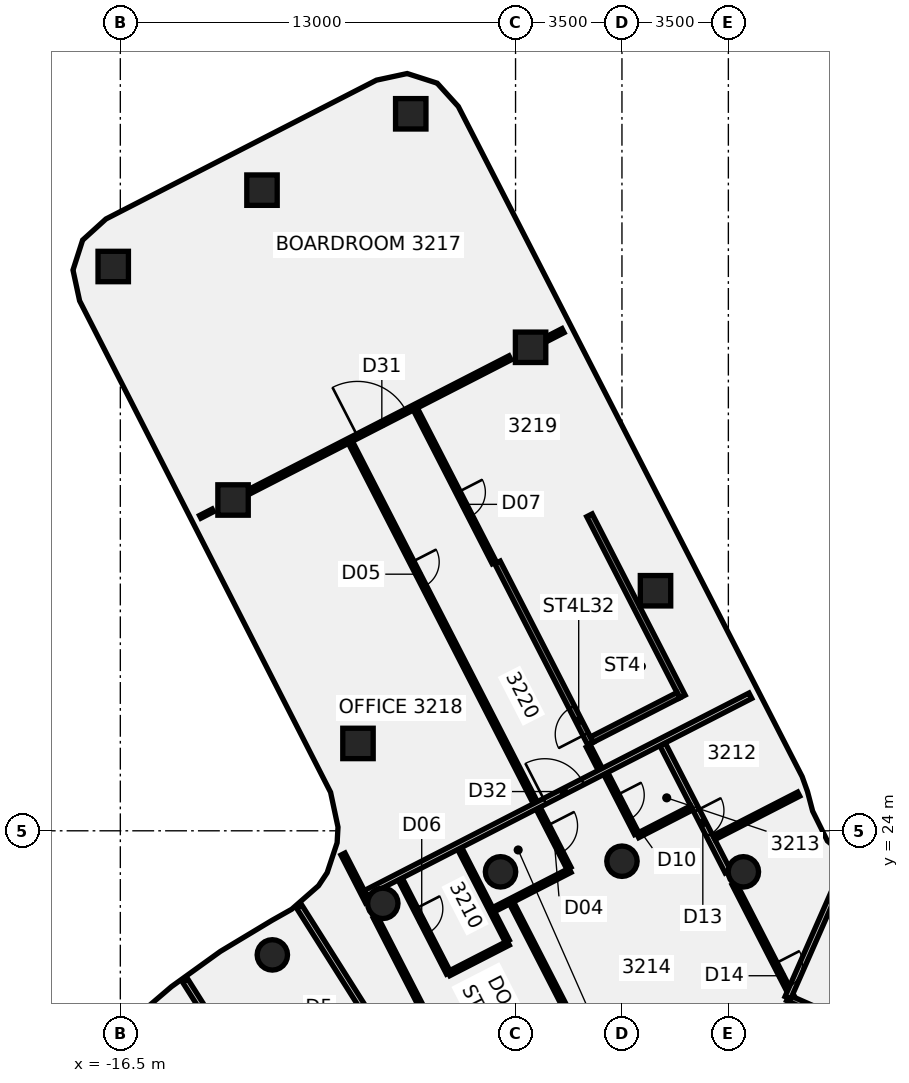
"""IFC4 building model, lengths in metres.
Left out: names, types, materials, properties, quantities, classifications, styles, units other than length and angle.
Written with IfcOpenShell. Run it as: python <this file> out.ifc"""

import sys

from ifc_helpers import new_model, si_unit, direction, frame, frame_2d, origin, origin_2d, place, context, subcontext, project, spatial, polyline, rectangle, circle, outline, extrude, element, fill, save


model = new_model("IFC4")
c1 = context("Model", 3, precision=1e-05, world=origin(), true_north=direction((0.0, 1.0)))
c2 = subcontext(c1, "Body", "Model", "MODEL_VIEW")
j1 = project(units=[si_unit("LENGTHUNIT", "METRE"), si_unit("PLANEANGLEUNIT", "RADIAN")], contexts=[c1])
p1 = place(None, origin())
s1 = spatial("IfcSite", under=j1, at=p1, CompositionType="ELEMENT")
p2 = place(p1, origin())
s2 = spatial("IfcBuilding", under=s1, at=p2, CompositionType="ELEMENT")
p3 = place(p2, frame((0.0, 0.0, 133.0)))
s3 = spatial("IfcBuildingStorey", under=s2, at=p3, CompositionType="ELEMENT", Elevation=133.0)
for number, where, z_axis, x_axis in (
    (1, (3.994, 22.651, -0.14), (0.0, 0.0, 1.0), (1.0, 0.0, 0.0)),
    (2, (0.0, 23.0, -0.14), (0.0, 0.0, 1.0), (1.0, 0.0, 0.0)),
    (3, (-3.994, 22.651, -0.14), (0.0, 0.0, 1.0), (1.0, 0.0, 0.0)),
    (4, (-7.866, 21.613, -0.14), (0.0, 0.0, 1.0), (1.0, 0.0, 0.0)),
    (5, (-11.5, 19.919, -0.14), (0.0, 0.0, 1.0), (1.0, 0.0, 0.0)),
):
    element("IfcColumn", number, at=place(p3, frame(where, z_axis=z_axis, x_axis=x_axis)), inside=s3, PredefinedType="COLUMN", context=c2, shape_type="SweptSolid", body=[
        extrude(circle(Radius=0.5, at=origin_2d()), origin(), (0.0, 0.0, 1.0), 3.75),
    ])
p4 = place(p3, frame((-12.792, 34.88, -0.134), z_axis=(-0.061871859426, -0.062521773916, 0.996123938472), x_axis=(0.887299968667, 0.453556116001, 0.083579993069)))
e6 = element("IfcColumn", 6, at=p4, inside=s3, PredefinedType="COLUMN", context=c2, shape_type="SweptSolid", body=[
    extrude(rectangle(XDim=1.0, YDim=1.0, at=origin_2d()), origin(), (0.0, 0.0, 1.0), 3.757),
])
p5 = place(p3, frame((-3.006, 39.903, -0.134), z_axis=(-0.086557736741, -0.015336055459, 0.996128788668), x_axis=(0.455375187571, -0.889923738813, 0.025868468099)))
e7 = element("IfcColumn", 7, at=p5, inside=s3, PredefinedType="COLUMN", context=c2, shape_type="SweptSolid", body=[
    extrude(rectangle(XDim=1.0, YDim=1.0, at=origin_2d()), origin(), (0.0, 0.0, 1.0), 3.757),
])
p6 = place(p3, frame((-8.683, 26.873, -0.136), z_axis=(-0.023249815242, -0.042396721911, 0.99883029793), x_axis=(0.888891864763, 0.45636204272, 0.040061686479)))
e8 = element("IfcColumn", 8, at=p6, inside=s3, PredefinedType="COLUMN", context=c2, shape_type="SweptSolid", body=[
    extrude(rectangle(XDim=1.0, YDim=1.0, at=origin_2d()), origin(), (0.0, 0.0, 1.0), 3.749),
])
p7 = place(p3, frame((1.104, 31.896, -0.136), z_axis=(-0.048124572307, 0.004949211766, 0.998829079895), x_axis=(0.455474581289, -0.889858610868, 0.026354477116)))
e9 = element("IfcColumn", 9, at=p7, inside=s3, PredefinedType="COLUMN", context=c2, shape_type="SweptSolid", body=[
    extrude(rectangle(XDim=1.0, YDim=1.0, at=origin_2d()), origin(), (0.0, 0.0, 1.0), 3.749),
])
p8 = place(p3, frame((-6.947, 47.583, -0.131), z_axis=(-0.130025765362, -0.021573490305, 0.991275887358), x_axis=(0.454113091891, -0.890036848371, 0.04019587435)))
e10 = element("IfcColumn", 10, at=p8, inside=s3, PredefinedType="COLUMN", context=c2, shape_type="SweptSolid", body=[
    extrude(rectangle(XDim=1.0, YDim=1.0, at=origin_2d()), origin(), (0.0, 0.0, 1.0), 3.757),
])
p9 = place(p3, frame((-11.84, 45.071, -0.133), z_axis=(-0.117801332946, -0.045053158792, 0.992014646484), x_axis=(0.455693217506, -0.890031586101, 0.013691868468)))
e11 = element("IfcColumn", 11, at=p9, inside=s3, PredefinedType="COLUMN", context=c2, shape_type="SweptSolid", body=[
    extrude(rectangle(XDim=1.0, YDim=1.0, at=origin_2d()), origin(), (0.0, 0.0, 1.0), 3.755),
])
p10 = place(p3, frame((-16.733, 42.56, -0.132), z_axis=(-0.105474361583, -0.068538826824, 0.992057250498), x_axis=(0.883135905889, 0.452121084233, 0.125129920171)))
e12 = element("IfcColumn", 12, at=p10, inside=s3, PredefinedType="COLUMN", context=c2, shape_type="SweptSolid", body=[
    extrude(rectangle(XDim=1.0, YDim=1.0, at=origin_2d()), origin(), (0.0, 0.0, 1.0), 3.754),
])
p11 = place(p3, frame((-9.176, 23.235, 0.0), z_axis=(0.0, 0.0, 1.0), x_axis=(0.456484124578, -0.889731557273, 0.0)))
e13 = element("IfcWall", 13, at=p11, inside=s3, PredefinedType="PARTITIONING", context=c2, shape_type="SweptSolid", body=[
    extrude(rectangle(XDim=1.776, YDim=0.15, at=frame_2d((0.888, 0.0))), origin(), (0.0, 0.0, 1.0), 3.01),
])
p12 = place(p3, frame((-8.116, 21.17, 0.0), z_axis=(0.0, 0.0, 1.0), x_axis=(0.456543941527, -0.889700865154, 0.0)))
e14 = element("IfcWall", 14, at=p12, inside=s3, PredefinedType="PARTITIONING", context=c2, shape_type="SweptSolid", body=[
    extrude(rectangle(XDim=10.314, YDim=0.15, at=frame_2d((5.157, 0.0))), origin(), (0.0, 0.0, 1.0), 3.01),
])
p13 = place(p3, frame((-8.932, 36.777, 0.0), z_axis=(0.0, 0.0, 1.0), x_axis=(0.456530071129, -0.889707982517, 0.0)))
e15 = element("IfcWall", 15, at=p13, inside=s3, PredefinedType="PARTITIONING", context=c2, shape_type="SweptSolid", body=[
    extrude(rectangle(XDim=15.745, YDim=0.15, at=frame_2d((7.873, 0.0))), origin(), (0.0, 0.0, 1.0), 3.01),
])
p14 = place(p13, frame((14.175, 0.0, 0.0)))
e16 = element("IfcOpeningElement", 16, at=p14, cuts=e15, PredefinedType="OPENING", context=c2, shape_type="SweptSolid", body=[
    extrude(rectangle(XDim=1.0, YDim=2.1, at=frame_2d((0.5, 1.05))), frame((0.0, 0.085, 0.0), z_axis=(0.0, -1.0, 0.0), x_axis=(1.0, 0.0, 0.0)), (0.0, 0.0, 1.0), 0.17),
])
p15 = place(p13, frame((4.425, 0.0, 0.0)))
e17 = element("IfcOpeningElement", 17, at=p15, cuts=e15, PredefinedType="OPENING", context=c2, shape_type="SweptSolid", body=[
    extrude(rectangle(XDim=0.9, YDim=2.1, at=frame_2d((0.45, 1.05))), frame((0.0, 0.085, 0.0), z_axis=(0.0, -1.0, 0.0), x_axis=(1.0, 0.0, 0.0)), (0.0, 0.0, 1.0), 0.17),
])
p16 = place(p3, frame((-7.294, 22.416, 0.0), z_axis=(0.0, 0.0, 1.0), x_axis=(0.456617130673, -0.889663304838, 0.0)))
e18 = element("IfcWall", 18, at=p16, inside=s3, PredefinedType="PARTITIONING", context=c2, shape_type="SweptSolid", body=[
    extrude(rectangle(XDim=3.48, YDim=0.15, at=frame_2d((1.74, 0.0))), origin(), (0.0, 0.0, 1.0), 3.01),
])
p17 = place(p16, frame((1.1, 0.0, 0.0)))
e19 = element("IfcOpeningElement", 19, at=p17, cuts=e18, PredefinedType="OPENING", context=c2, shape_type="SweptSolid", body=[
    extrude(rectangle(XDim=0.9, YDim=2.1, at=frame_2d((0.45, 1.05))), frame((0.0, 0.085, 0.0), z_axis=(0.0, -1.0, 0.0), x_axis=(1.0, 0.0, 0.0)), (0.0, 0.0, 1.0), 0.17),
])
p18 = place(p3, frame((-6.794, 37.869, 0.0), z_axis=(0.0, 0.0, 1.0), x_axis=(0.456575783118, -0.889684525138, 0.0)))
e20 = element("IfcWall", 20, at=p18, inside=s3, PredefinedType="PARTITIONING", context=c2, shape_type="SweptSolid", body=[
    extrude(rectangle(XDim=5.68, YDim=0.15, at=frame_2d((2.84, 0.0))), origin(), (0.0, 0.0, 1.0), 3.01),
])
p19 = place(p18, frame((3.07, 0.0, 0.0)))
e21 = element("IfcOpeningElement", 21, at=p19, cuts=e20, PredefinedType="OPENING", context=c2, shape_type="SweptSolid", body=[
    extrude(rectangle(XDim=0.9, YDim=2.1, at=frame_2d((0.45, 1.05))), frame((0.0, 0.085, 0.0), z_axis=(0.0, -1.0, 0.0), x_axis=(1.0, 0.0, 0.0)), (0.0, 0.0, 1.0), 0.17),
])
p20 = place(p3, frame((-1.105, 26.783, 0.0), z_axis=(0.0, 0.0, 1.0), x_axis=(0.456670300409, -0.889636013617, 0.0)))
e22 = element("IfcWall", 22, at=p20, inside=s3, PredefinedType="PARTITIONING", context=c2, shape_type="SweptSolid", body=[
    extrude(rectangle(XDim=0.855, YDim=0.15, at=frame_2d((0.427, 0.0))), origin(), (0.0, 0.0, 1.0), 3.01),
])
p21 = place(p3, frame((-5.337, 23.42, 0.0), z_axis=(0.0, 0.0, 1.0), x_axis=(0.456682724055, -0.889629636169, 0.0)))
e23 = element("IfcWall", 23, at=p21, inside=s3, PredefinedType="PARTITIONING", context=c2, shape_type="SweptSolid", body=[
    extrude(rectangle(XDim=3.425, YDim=0.15, at=frame_2d((1.712, 0.0))), origin(), (0.0, 0.0, 1.0), 3.01),
])
p22 = place(p3, frame((-3.63, 21.627, 0.0), z_axis=(0.0, 0.0, 1.0), x_axis=(0.456496994871, -0.889724953946, 0.0)))
e24 = element("IfcWall", 24, at=p22, inside=s3, PredefinedType="PARTITIONING", context=c2, shape_type="SweptSolid", body=[
    extrude(rectangle(XDim=10.828, YDim=0.15, at=frame_2d((5.414, 0.0))), origin(), (0.0, 0.0, 1.0), 3.01),
])
p23 = place(p22, frame((6.525, 0.0, 0.0)))
e25 = element("IfcOpeningElement", 25, at=p23, cuts=e24, PredefinedType="OPENING", context=c2, shape_type="SweptSolid", body=[
    extrude(rectangle(XDim=0.9, YDim=2.1, at=frame_2d((0.45, 1.05))), frame((0.0, 0.085, 0.0), z_axis=(0.0, -1.0, 0.0), x_axis=(1.0, 0.0, 0.0)), (0.0, 0.0, 1.0), 0.17),
])
p24 = place(p3, frame((-0.532, 25.885, 0.0), z_axis=(0.0, 0.0, 1.0), x_axis=(0.456385875157, -0.889781958098, 0.0)))
e26 = element("IfcWall", 26, at=p24, inside=s3, PredefinedType="PARTITIONING", context=c2, shape_type="SweptSolid", body=[
    extrude(rectangle(XDim=2.219, YDim=0.15, at=frame_2d((1.11, 0.0))), origin(), (0.0, 0.0, 1.0), 3.01),
])
p25 = place(p24, frame((0.8, 0.0, 0.0)))
e27 = element("IfcOpeningElement", 27, at=p25, cuts=e26, PredefinedType="OPENING", context=c2, shape_type="SweptSolid", body=[
    extrude(rectangle(XDim=0.9, YDim=2.1, at=frame_2d((0.45, 1.05))), frame((0.0, 0.085, 0.0), z_axis=(0.0, -1.0, 0.0), x_axis=(1.0, 0.0, 0.0)), (0.0, 0.0, 1.0), 0.17),
])
p26 = place(p3, frame((1.336, 26.844, 0.0), z_axis=(0.0, 0.0, 1.0), x_axis=(0.456669351615, -0.889636500654, 0.0)))
e28 = element("IfcWall", 28, at=p26, inside=s3, PredefinedType="PARTITIONING", context=c2, shape_type="SweptSolid", body=[
    extrude(rectangle(XDim=4.707, YDim=0.2, at=frame_2d((2.354, 0.0))), origin(), (0.0, 0.0, 1.0), 3.01),
])
p27 = place(p26, frame((2.45, 0.0, 0.0)))
e29 = element("IfcOpeningElement", 29, at=p27, cuts=e28, PredefinedType="OPENING", context=c2, shape_type="SweptSolid", body=[
    extrude(rectangle(XDim=0.9, YDim=2.1, at=frame_2d((0.45, 1.05))), frame((0.0, 0.11, 0.0), z_axis=(0.0, -1.0, 0.0), x_axis=(1.0, 0.0, 0.0)), (0.0, 0.0, 1.0), 0.22),
])
p28 = place(p3, frame((3.69, 22.258, 0.0), z_axis=(0.0, 0.0, 1.0), x_axis=(0.45668207617, -0.889629968754, 0.0)))
e30 = element("IfcWall", 30, at=p28, inside=s3, PredefinedType="PARTITIONING", context=c2, shape_type="SweptSolid", body=[
    extrude(rectangle(XDim=11.542, YDim=0.15, at=frame_2d((5.771, 0.0))), origin(), (0.0, 0.0, 1.0), 3.01),
])
p29 = place(p28, frame((2.95, 0.0, 0.0)))
e31 = element("IfcOpeningElement", 31, at=p29, cuts=e30, PredefinedType="OPENING", context=c2, shape_type="SweptSolid", body=[
    extrude(rectangle(XDim=0.9, YDim=2.1, at=frame_2d((0.45, 1.05))), frame((0.0, 0.085, 0.0), z_axis=(0.0, -1.0, 0.0), x_axis=(1.0, 0.0, 0.0)), (0.0, 0.0, 1.0), 0.17),
])
p30 = place(p3, frame((-13.872, 34.326, 0.0), z_axis=(0.0, 0.0, 1.0), x_axis=(0.889659123309, 0.456625277786, 0.0)))
e32 = element("IfcWall", 32, at=p30, inside=s3, PredefinedType="PARTITIONING", context=c2, shape_type="SweptSolid", body=[
    extrude(rectangle(XDim=0.466, YDim=0.1, at=frame_2d((0.233, 0.0))), origin(), (0.0, 0.0, 1.0), 3.01),
])
p31 = place(p3, frame((-12.396, 35.084, 0.0), z_axis=(0.0, 0.0, 1.0), x_axis=(0.889696484295, 0.456552478729, 0.0)))
e33 = element("IfcWall", 33, at=p31, inside=s3, PredefinedType="PARTITIONING", context=c2, shape_type="SweptSolid", body=[
    extrude(rectangle(XDim=9.793, YDim=0.15, at=frame_2d((4.897, 0.0))), origin(), (0.0, 0.0, 1.0), 3.01),
])
p32 = place(p31, frame((4.155, 0.0, 0.0)))
e34 = element("IfcOpeningElement", 34, at=p32, cuts=e33, PredefinedType="OPENING", context=c2, shape_type="SweptSolid", body=[
    extrude(rectangle(XDim=1.8, YDim=2.1, at=frame_2d((0.9, 1.05))), frame((0.0, 0.085, 0.0), z_axis=(0.0, -1.0, 0.0), x_axis=(1.0, 0.0, 0.0)), (0.0, 0.0, 1.0), 0.17),
])
p33 = place(p3, frame((-2.619, 40.101, 0.0), z_axis=(0.0, 0.0, 1.0), x_axis=(0.889784233191, 0.456381439549, 0.0)))
e35 = element("IfcWall", 35, at=p33, inside=s3, PredefinedType="PARTITIONING", context=c2, shape_type="SweptSolid", body=[
    extrude(rectangle(XDim=0.765, YDim=0.15, at=frame_2d((0.382, 0.0))), origin(), (0.0, 0.0, 1.0), 3.01),
])
p34 = place(p3, frame((-8.426, 21.948, 0.0), z_axis=(0.0, 0.0, 1.0), x_axis=(0.889606613969, 0.456727569108, 0.0)))
e36 = element("IfcWall", 36, at=p34, inside=s3, PredefinedType="PARTITIONING", context=c2, shape_type="SweptSolid", body=[
    extrude(rectangle(XDim=14.219, YDim=0.2, at=frame_2d((7.11, 0.0))), origin(), (0.0, 0.0, 1.0), 3.01),
])
p35 = place(p34, frame((6.62, 0.0, 0.0)))
e37 = element("IfcOpeningElement", 37, at=p35, cuts=e36, PredefinedType="OPENING", context=c2, shape_type="SweptSolid", body=[
    extrude(rectangle(XDim=1.4, YDim=2.1, at=frame_2d((0.7, 1.05))), frame((0.0, 0.11, 0.0), z_axis=(0.0, -1.0, 0.0), x_axis=(1.0, 0.0, 0.0)), (0.0, 0.0, 1.0), 0.22),
])
p36 = place(p3, frame((-5.696, 19.302, 0.0), z_axis=(0.0, 0.0, 1.0), x_axis=(0.889761986003, 0.456424811183, 0.0)))
e38 = element("IfcWall", 38, at=p36, inside=s3, PredefinedType="PARTITIONING", context=c2, shape_type="SweptSolid", body=[
    extrude(rectangle(XDim=2.199, YDim=0.15, at=frame_2d((1.1, 0.0))), origin(), (0.0, 0.0, 1.0), 3.01),
])
p37 = place(p3, frame((3.028, 23.778, 0.0), z_axis=(0.0, 0.0, 1.0), x_axis=(0.889763060591, 0.456422716358, 0.0)))
e39 = element("IfcWall", 39, at=p37, inside=s3, PredefinedType="PARTITIONING", context=c2, shape_type="SweptSolid", body=[
    extrude(rectangle(XDim=3.131, YDim=0.15, at=frame_2d((1.565, 0.0))), origin(), (0.0, 0.0, 1.0), 3.01),
])
p38 = place(p3, frame((-4.22, 21.408, 0.0), z_axis=(0.0, 0.0, 1.0), x_axis=(0.889499615921, 0.456935918128, 0.0)))
e40 = element("IfcWall", 40, at=p38, inside=s3, PredefinedType="PARTITIONING", context=c2, shape_type="SweptSolid", body=[
    extrude(rectangle(XDim=2.825, YDim=0.15, at=frame_2d((1.413, 0.0))), origin(), (0.0, 0.0, 1.0), 3.01),
])
p39 = place(p3, frame((0.516, 23.841, 0.0), z_axis=(0.0, 0.0, 1.0), x_axis=(0.889517422717, 0.456901252662, 0.0)))
e41 = element("IfcWall", 41, at=p39, inside=s3, PredefinedType="PARTITIONING", context=c2, shape_type="SweptSolid", body=[
    extrude(rectangle(XDim=2.0, YDim=0.15, at=frame_2d((1.0, 0.0))), origin(), (0.0, 0.0, 1.0), 3.01),
])
p40 = place(p3, frame((9.061, 16.918, 0.0), z_axis=(0.0, 0.0, 1.0), x_axis=(-0.915163294104, 0.403083297999, 0.0)))
e42 = element("IfcWall", 42, at=p40, inside=s3, PredefinedType="SOLIDWALL", context=c2, shape_type="SweptSolid", body=[
    extrude(rectangle(XDim=3.94, YDim=0.2, at=frame_2d((1.97, 0.0))), origin(), (0.0, 0.0, 1.0), 3.61),
])
p41 = place(p40, frame((1.07, 0.0, 0.0)))
e43 = element("IfcOpeningElement", 43, at=p41, cuts=e42, PredefinedType="OPENING", context=c2, shape_type="SweptSolid", body=[
    extrude(rectangle(XDim=1.8, YDim=2.4, at=frame_2d((0.9, 1.2))), frame((0.0, 0.11, 0.0), z_axis=(0.0, -1.0, 0.0), x_axis=(1.0, 0.0, 0.0)), (0.0, 0.0, 1.0), 0.22),
])
p42 = place(p3, frame((5.456, 18.506, 0.0), z_axis=(0.0, 0.0, 1.0), x_axis=(0.403071348588, 0.915168557124, 0.0)))
e44 = element("IfcWall", 44, at=p42, inside=s3, PredefinedType="SOLIDWALL", context=c2, shape_type="SweptSolid", body=[
    extrude(rectangle(XDim=4.893, YDim=0.2, at=frame_2d((2.446, 0.0))), origin(), (0.0, 0.0, 1.0), 3.61),
])
p43 = place(p3, frame((-8.073, 17.482, 0.0), z_axis=(0.0, 0.0, 1.0), x_axis=(-0.534101065581, 0.845420635982, 0.0)))
e45 = element("IfcWall", 45, at=p43, inside=s3, PredefinedType="SOLIDWALL", context=c2, shape_type="SweptSolid", body=[
    extrude(rectangle(XDim=4.759, YDim=0.2, at=frame_2d((2.38, 0.0))), origin(), (0.0, 0.0, 1.0), 3.61),
])
p44 = place(p3, frame((-11.853, 15.094, 0.0), z_axis=(0.0, 0.0, 1.0), x_axis=(-0.534084671669, 0.845430992742, 0.0)))
e46 = element("IfcWall", 46, at=p44, inside=s3, PredefinedType="SOLIDWALL", context=c2, shape_type="SweptSolid", body=[
    extrude(rectangle(XDim=4.709, YDim=0.2, at=frame_2d((2.354, 0.0))), origin(), (0.0, 0.0, 1.0), 3.61),
])
p45 = place(p3, frame((-1.035, 26.864, -0.14), z_axis=(0.0, 0.0, 1.0), x_axis=(-0.456546705756, 0.889699446703, 0.0)))
e47 = element("IfcWall", 47, at=p45, inside=s3, PredefinedType="SHEAR", context=c2, shape_type="SweptSolid", body=[
    extrude(rectangle(XDim=6.7, YDim=0.2, at=frame_2d((3.35, 0.0))), origin(), (0.0, 0.0, 1.0), 3.15),
])
p46 = place(p45, frame((0.35, 0.0, 0.0)))
e48 = element("IfcOpeningElement", 48, at=p46, cuts=e47, PredefinedType="OPENING", context=c2, shape_type="SweptSolid", body=[
    extrude(rectangle(XDim=1.0, YDim=2.1, at=frame_2d((0.5, 1.05))), frame((0.0, 0.11, 0.0), z_axis=(0.0, -1.0, 0.0), x_axis=(1.0, 0.0, 0.0)), (0.0, 0.0, 1.0), 0.22),
])
p47 = place(p3, frame((1.99, 28.416, -0.14), z_axis=(0.0, 0.0, 1.0), x_axis=(-0.456546705756, 0.889699446703, 0.0)))
e49 = element("IfcWall", 49, at=p47, inside=s3, PredefinedType="SHEAR", context=c2, shape_type="SweptSolid", body=[
    extrude(rectangle(XDim=6.7, YDim=0.2, at=frame_2d((3.35, 0.0))), origin(), (0.0, 0.0, 1.0), 3.15),
])
p48 = place(p3, frame((1.855, 28.46, -0.14), z_axis=(0.0, 0.0, 1.0), x_axis=(-0.889693512727, -0.456558269459, 0.0)))
e50 = element("IfcWall", 50, at=p48, inside=s3, PredefinedType="SHEAR", context=c2, shape_type="SweptSolid", body=[
    extrude(rectangle(XDim=3.2, YDim=0.2, at=frame_2d((1.6, 0.0))), origin(), (0.0, 0.0, 1.0), 3.15),
])
p49 = place(p3, frame((0.0, 0.0, -0.14)))
e51 = element("IfcWall", 51, at=p49, inside=s3, PredefinedType="SHEAR", context=c2, shape_type="SweptSolid", body=[
    extrude(outline(polyline([(-1.066, 34.154), (-1.158, 34.332), (-4.005, 32.871), (-3.914, 32.693), (-1.066, 34.154)])), origin(), (0.0, 0.0, 1.0), 3.15),
])
p50 = place(p14, frame((1.0, 0.0, 0.0), z_axis=(0.0, 0.0, 1.0), x_axis=(-1.0, 0.0, 0.0)))
e52 = element("IfcDoor", 52, at=p50, inside=s3, OperationType="SINGLE_SWING_RIGHT", PredefinedType="DOOR", context=c2, shape_type="SweptSolid", body=[
    extrude(rectangle(XDim=1.0, YDim=2.1, at=frame_2d((0.5, 1.05))), frame((0.0, 0.025, 0.0), z_axis=(0.0, -1.0, 0.0), x_axis=(1.0, 0.0, 0.0)), (0.0, 0.0, 1.0), 0.05),
])
fill(e16, e52)
p51 = place(p15, frame((0.9, 0.0, 0.0), z_axis=(0.0, 0.0, 1.0), x_axis=(-1.0, 0.0, 0.0)))
e53 = element("IfcDoor", 53, at=p51, inside=s3, OperationType="SINGLE_SWING_LEFT", PredefinedType="DOOR", context=c2, shape_type="SweptSolid", body=[
    extrude(rectangle(XDim=0.9, YDim=2.1, at=frame_2d((0.45, 1.05))), frame((0.0, 0.025, 0.0), z_axis=(0.0, -1.0, 0.0), x_axis=(1.0, 0.0, 0.0)), (0.0, 0.0, 1.0), 0.05),
])
fill(e17, e53)
p52 = place(p17, origin())
e54 = element("IfcDoor", 54, at=p52, inside=s3, OperationType="SINGLE_SWING_RIGHT", PredefinedType="DOOR", context=c2, shape_type="SweptSolid", body=[
    extrude(rectangle(XDim=0.9, YDim=2.1, at=frame_2d((0.45, 1.05))), frame((0.0, 0.025, 0.0), z_axis=(0.0, -1.0, 0.0), x_axis=(1.0, 0.0, 0.0)), (0.0, 0.0, 1.0), 0.05),
])
fill(e19, e54)
p53 = place(p19, origin())
e55 = element("IfcDoor", 55, at=p53, inside=s3, OperationType="SINGLE_SWING_LEFT", PredefinedType="DOOR", context=c2, shape_type="SweptSolid", body=[
    extrude(rectangle(XDim=0.9, YDim=2.1, at=frame_2d((0.45, 1.05))), frame((0.0, 0.025, 0.0), z_axis=(0.0, -1.0, 0.0), x_axis=(1.0, 0.0, 0.0)), (0.0, 0.0, 1.0), 0.05),
])
fill(e21, e55)
p54 = place(p25, origin())
e56 = element("IfcDoor", 56, at=p54, inside=s3, OperationType="SINGLE_SWING_LEFT", PredefinedType="DOOR", context=c2, shape_type="SweptSolid", body=[
    extrude(rectangle(XDim=0.9, YDim=2.1, at=frame_2d((0.45, 1.05))), frame((0.0, 0.025, 0.0), z_axis=(0.0, -1.0, 0.0), x_axis=(1.0, 0.0, 0.0)), (0.0, 0.0, 1.0), 0.05),
])
fill(e27, e56)
p55 = place(p27, origin())
e57 = element("IfcDoor", 57, at=p55, inside=s3, OperationType="SINGLE_SWING_LEFT", PredefinedType="DOOR", context=c2, shape_type="SweptSolid", body=[
    extrude(rectangle(XDim=0.9, YDim=2.1, at=frame_2d((0.45, 1.05))), frame((0.0, 0.025, 0.0), z_axis=(0.0, -1.0, 0.0), x_axis=(1.0, 0.0, 0.0)), (0.0, 0.0, 1.0), 0.05),
])
fill(e29, e57)
p56 = place(p29, origin())
e58 = element("IfcDoor", 58, at=p56, inside=s3, OperationType="SINGLE_SWING_RIGHT", PredefinedType="DOOR", context=c2, shape_type="SweptSolid", body=[
    extrude(rectangle(XDim=0.9, YDim=2.1, at=frame_2d((0.45, 1.05))), frame((0.0, 0.025, 0.0), z_axis=(0.0, -1.0, 0.0), x_axis=(1.0, 0.0, 0.0)), (0.0, 0.0, 1.0), 0.05),
])
fill(e31, e58)
p57 = place(p32, frame((1.8, 0.0, 0.0), z_axis=(0.0, 0.0, 1.0), x_axis=(-1.0, 0.0, 0.0)))
e59 = element("IfcDoor", 59, at=p57, inside=s3, OperationType="DOUBLE_DOOR_SINGLE_SWING", PredefinedType="DOOR", context=c2, shape_type="SweptSolid", body=[
    extrude(rectangle(XDim=1.8, YDim=2.1, at=frame_2d((0.9, 1.05))), frame((0.0, 0.025, 0.0), z_axis=(0.0, -1.0, 0.0), x_axis=(1.0, 0.0, 0.0)), (0.0, 0.0, 1.0), 0.05),
])
fill(e34, e59)
p58 = place(p35, frame((1.4, 0.0, 0.0), z_axis=(0.0, 0.0, 1.0), x_axis=(-1.0, 0.0, 0.0)))
e60 = element("IfcDoor", 60, at=p58, inside=s3, OperationType="DOUBLE_DOOR_SINGLE_SWING", PredefinedType="DOOR", context=c2, shape_type="SweptSolid", body=[
    extrude(rectangle(XDim=1.4, YDim=2.1, at=frame_2d((0.7, 1.05))), frame((0.0, 0.025, 0.0), z_axis=(0.0, -1.0, 0.0), x_axis=(1.0, 0.0, 0.0)), (0.0, 0.0, 1.0), 0.05),
])
fill(e37, e60)
p59 = place(p46, origin())
e61 = element("IfcDoor", 61, at=p59, inside=s3, OperationType="SINGLE_SWING_LEFT", PredefinedType="DOOR", context=c2, shape_type="SweptSolid", body=[
    extrude(rectangle(XDim=1.0, YDim=2.1, at=frame_2d((0.5, 1.05))), frame((0.0, 0.025, 0.0), z_axis=(0.0, -1.0, 0.0), x_axis=(1.0, 0.0, 0.0)), (0.0, 0.0, 1.0), 0.05),
])
fill(e48, e61)
save(model, sys.argv[1])
